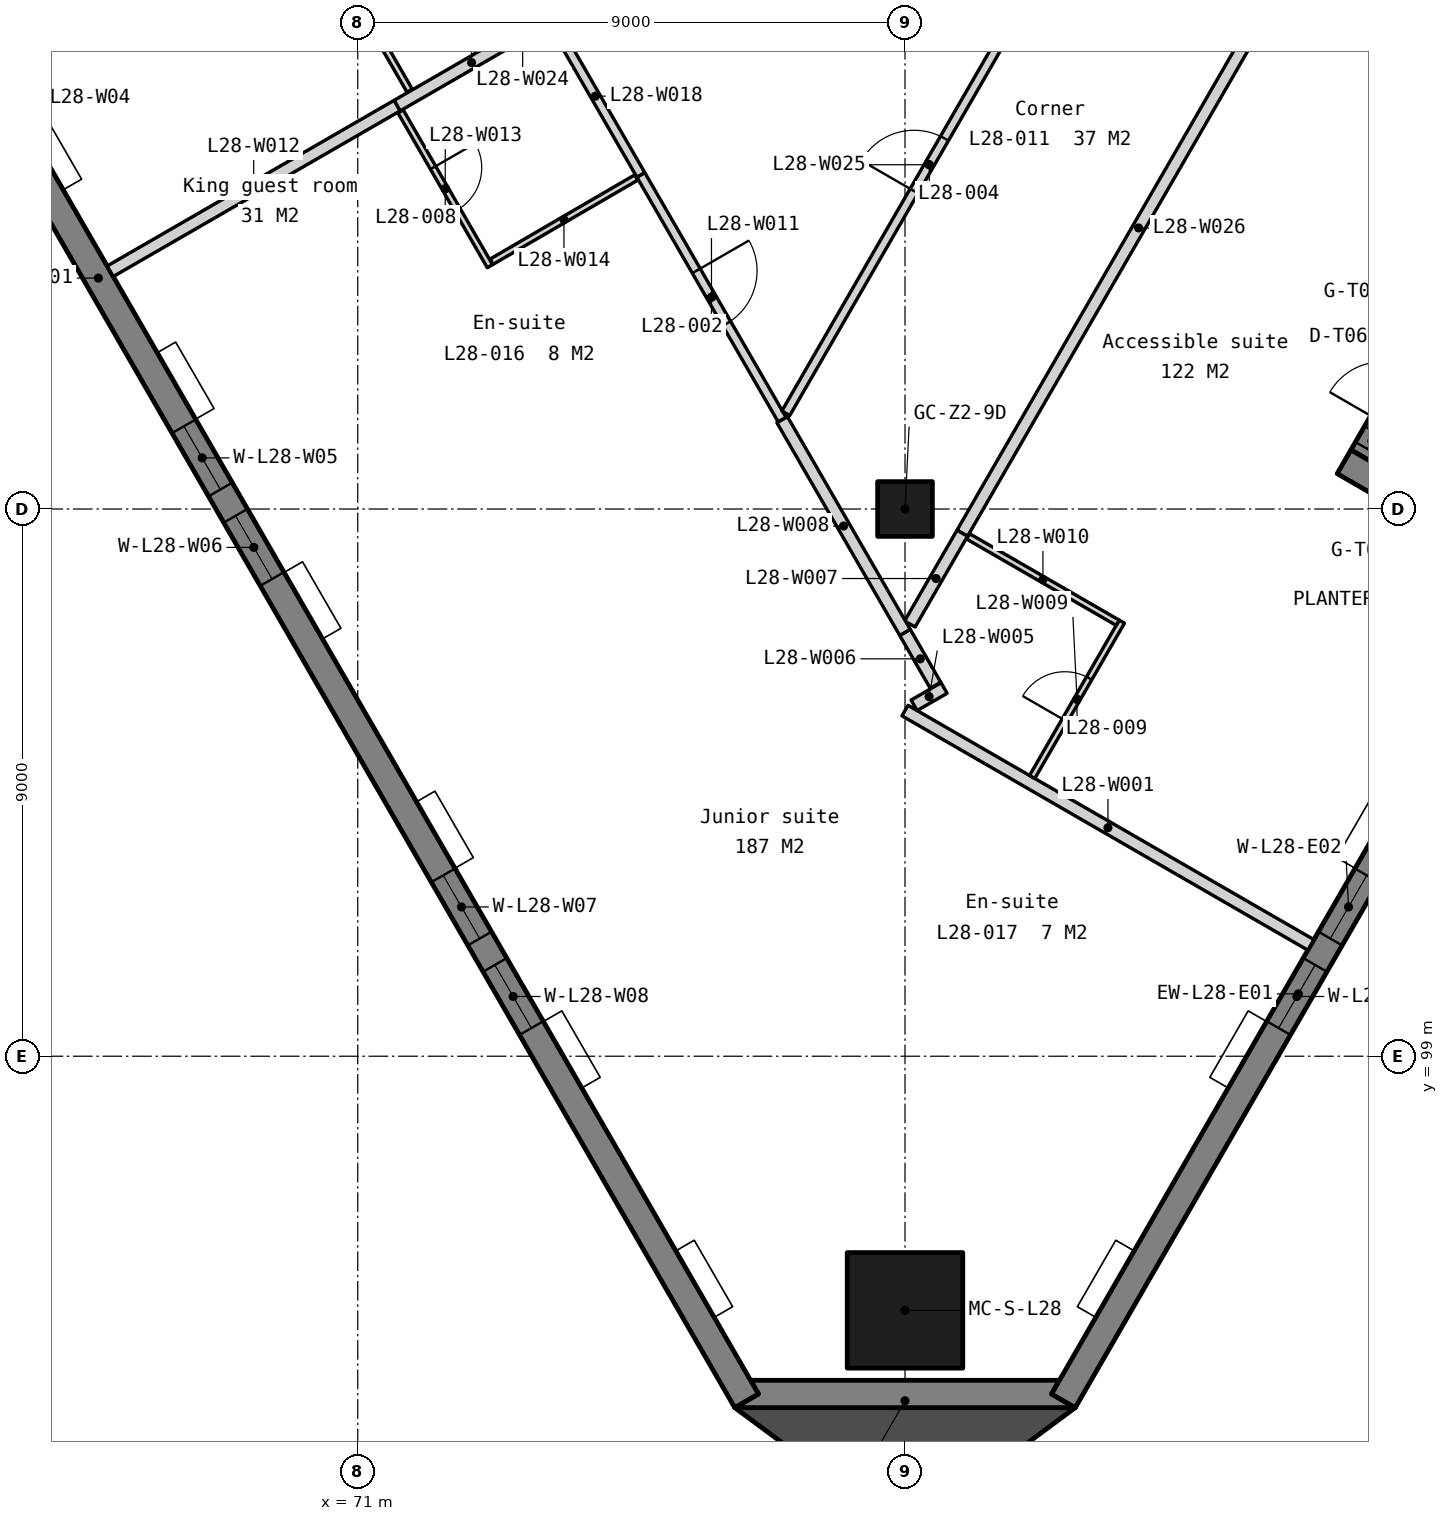
"""IFC4 building model, lengths in metres.
Left out: names, types, materials, properties, quantities, classifications, styles, units other than length and angle.
Written with IfcOpenShell. Run it as: python <this file> out.ifc"""

import sys

from ifc_helpers import new_model, si_unit, direction, frame, frame_2d, origin, origin_2d, place, context, subcontext, project, spatial, polyline, rectangle, outline, extrude, element, fill, save


model = new_model("IFC4")
c1 = context("Model", 3, precision=1e-05, world=origin(), true_north=direction((0.0, 1.0)))
c2 = subcontext(c1, "Body", "Model", "MODEL_VIEW")
j1 = project(units=[si_unit("LENGTHUNIT", "METRE"), si_unit("PLANEANGLEUNIT", "RADIAN")], contexts=[c1])
p1 = place(None, origin())
s1 = spatial("IfcSite", under=j1, at=p1, CompositionType="ELEMENT")
p2 = place(p1, origin())
s2 = spatial("IfcBuilding", under=s1, at=p2, CompositionType="ELEMENT")
p3 = place(p2, frame((0.0, 0.0, 113.3)))
s3 = spatial("IfcBuildingStorey", under=s2, at=p3, CompositionType="ELEMENT", Elevation=113.3)
p4 = place(p3, frame((80.0, 108.0, 0.0), z_axis=(0.0, 0.0, 1.0), x_axis=(1.0, 0.0, 0.0)))
e1 = element("IfcColumn", 1, at=p4, inside=s3, PredefinedType="COLUMN", context=c2, shape_type="SweptSolid", body=[
    extrude(rectangle(XDim=0.9, YDim=0.9, at=origin_2d()), origin(), (0.0, 0.0, 1.0), 3.5),
])
p5 = place(p3, frame((80.0, 94.82, 0.0), z_axis=(0.0, 0.0, 1.0), x_axis=(1.0, 0.0, 0.0)))
e2 = element("IfcColumn", 2, at=p5, inside=s3, PredefinedType="COLUMN", context=c2, shape_type="SweptSolid", body=[
    extrude(rectangle(XDim=1.9, YDim=1.9, at=origin_2d()), origin(), (0.0, 0.0, 1.0), 3.5),
])
p6 = place(p3, frame((0.0, 0.0, -0.15)))
e3 = element("IfcWall", 3, at=p6, inside=s3, PredefinedType="SOLIDWALL", context=c2, shape_type="SweptSolid", body=[
    extrude(outline(polyline([(77.2, 93.22), (77.59, 93.445), (77.46, 93.67), (82.54, 93.67), (82.41, 93.445), (82.8, 93.22), (77.2, 93.22)])), origin(), (0.0, 0.0, 1.0), 3.5),
])
p7 = place(p3, frame((56.073, 130.263, -0.15), z_axis=(0.0, 0.0, 1.0), x_axis=(0.500000478905, -0.866025127289, 0.0)))
e4 = element("IfcWall", 4, at=p7, inside=s3, PredefinedType="SOLIDWALL", context=c2, shape_type="SweptSolid", body=[
    extrude(outline(polyline([(42.643, 0.0), (42.643, 3.5), (0.0, 3.5), (0.0, 0.0), (42.643, 0.0)])), frame((0.0, 0.225, 0.0), z_axis=(0.0, -1.0, 0.0), x_axis=(1.0, 0.0, 0.0)), (0.0, 0.0, 1.0), 0.45),
])
p8 = place(p7, frame((7.079, 0.0, 1.05)))
e5 = element("IfcOpeningElement", 5, at=p8, cuts=e4, PredefinedType="OPENING", context=c2, shape_type="SweptSolid", body=[
    extrude(rectangle(XDim=1.2, YDim=1.5, at=frame_2d((0.6, 0.75))), frame((0.0, 0.235, 0.0), z_axis=(0.0, -1.0, 0.0), x_axis=(1.0, 0.0, 0.0)), (0.0, 0.0, 1.0), 0.47),
])
p9 = place(p7, frame((8.779, 0.0, 1.05)))
e6 = element("IfcOpeningElement", 6, at=p9, cuts=e4, PredefinedType="OPENING", context=c2, shape_type="SweptSolid", body=[
    extrude(rectangle(XDim=1.2, YDim=1.5, at=frame_2d((0.6, 0.75))), frame((0.0, 0.235, 0.0), z_axis=(0.0, -1.0, 0.0), x_axis=(1.0, 0.0, 0.0)), (0.0, 0.0, 1.0), 0.47),
])
p10 = place(p7, frame((15.607, 0.0, 1.05)))
e7 = element("IfcOpeningElement", 7, at=p10, cuts=e4, PredefinedType="OPENING", context=c2, shape_type="SweptSolid", body=[
    extrude(rectangle(XDim=1.2, YDim=1.5, at=frame_2d((0.6, 0.75))), frame((0.0, 0.235, 0.0), z_axis=(0.0, -1.0, 0.0), x_axis=(1.0, 0.0, 0.0)), (0.0, 0.0, 1.0), 0.47),
])
p11 = place(p7, frame((17.307, 0.0, 1.05)))
e8 = element("IfcOpeningElement", 8, at=p11, cuts=e4, PredefinedType="OPENING", context=c2, shape_type="SweptSolid", body=[
    extrude(rectangle(XDim=1.2, YDim=1.5, at=frame_2d((0.6, 0.75))), frame((0.0, 0.235, 0.0), z_axis=(0.0, -1.0, 0.0), x_axis=(1.0, 0.0, 0.0)), (0.0, 0.0, 1.0), 0.47),
])
p12 = place(p7, frame((24.136, 0.0, 1.05)))
e9 = element("IfcOpeningElement", 9, at=p12, cuts=e4, PredefinedType="OPENING", context=c2, shape_type="SweptSolid", body=[
    extrude(rectangle(XDim=1.2, YDim=1.5, at=frame_2d((0.6, 0.75))), frame((0.0, 0.235, 0.0), z_axis=(0.0, -1.0, 0.0), x_axis=(1.0, 0.0, 0.0)), (0.0, 0.0, 1.0), 0.47),
])
p13 = place(p7, frame((25.836, 0.0, 1.05)))
e10 = element("IfcOpeningElement", 10, at=p13, cuts=e4, PredefinedType="OPENING", context=c2, shape_type="SweptSolid", body=[
    extrude(rectangle(XDim=1.2, YDim=1.5, at=frame_2d((0.6, 0.75))), frame((0.0, 0.235, 0.0), z_axis=(0.0, -1.0, 0.0), x_axis=(1.0, 0.0, 0.0)), (0.0, 0.0, 1.0), 0.47),
])
p14 = place(p7, frame((32.665, 0.0, 1.05)))
e11 = element("IfcOpeningElement", 11, at=p14, cuts=e4, PredefinedType="OPENING", context=c2, shape_type="SweptSolid", body=[
    extrude(rectangle(XDim=1.2, YDim=1.5, at=frame_2d((0.6, 0.75))), frame((0.0, 0.235, 0.0), z_axis=(0.0, -1.0, 0.0), x_axis=(1.0, 0.0, 0.0)), (0.0, 0.0, 1.0), 0.47),
])
p15 = place(p7, frame((34.365, 0.0, 1.05)))
e12 = element("IfcOpeningElement", 12, at=p15, cuts=e4, PredefinedType="OPENING", context=c2, shape_type="SweptSolid", body=[
    extrude(rectangle(XDim=1.2, YDim=1.5, at=frame_2d((0.6, 0.75))), frame((0.0, 0.235, 0.0), z_axis=(0.0, -1.0, 0.0), x_axis=(1.0, 0.0, 0.0)), (0.0, 0.0, 1.0), 0.47),
])
p16 = place(p3, frame((82.605, 93.333, -0.15), z_axis=(0.0, 0.0, 1.0), x_axis=(0.499991795389, 0.866030140667, 0.0)))
e13 = element("IfcWall", 13, at=p16, inside=s3, PredefinedType="SOLIDWALL", context=c2, shape_type="SweptSolid", body=[
    extrude(outline(polyline([(0.0, 0.0), (0.0, 3.5), (15.457, 3.5), (15.457, 0.0), (0.0, 0.0)])), frame((0.0, 0.225, 0.0), z_axis=(0.0, -1.0, 0.0), x_axis=(1.0, 0.0, 0.0)), (0.0, 0.0, 1.0), 0.45),
])
p17 = place(p16, frame((7.079, 0.0, 1.05)))
e14 = element("IfcOpeningElement", 14, at=p17, cuts=e13, PredefinedType="OPENING", context=c2, shape_type="SweptSolid", body=[
    extrude(rectangle(XDim=1.2, YDim=1.5, at=frame_2d((0.6, 0.75))), frame((0.0, 0.235, 0.0), z_axis=(0.0, -1.0, 0.0), x_axis=(1.0, 0.0, 0.0)), (0.0, 0.0, 1.0), 0.47),
])
p18 = place(p16, frame((8.779, 0.0, 1.05)))
e15 = element("IfcOpeningElement", 15, at=p18, cuts=e13, PredefinedType="OPENING", context=c2, shape_type="SweptSolid", body=[
    extrude(rectangle(XDim=1.2, YDim=1.5, at=frame_2d((0.6, 0.75))), frame((0.0, 0.235, 0.0), z_axis=(0.0, -1.0, 0.0), x_axis=(1.0, 0.0, 0.0)), (0.0, 0.0, 1.0), 0.47),
])
p19 = place(p3, frame((90.641, 106.802, 0.0), z_axis=(0.0, 0.0, 1.0), x_axis=(-0.866047669374, 0.499961432884, 0.0)))
e16 = element("IfcWall", 16, at=p19, inside=s3, PredefinedType="SOLIDWALL", context=c2, shape_type="SweptSolid", body=[
    extrude(rectangle(XDim=3.95, YDim=0.45, at=frame_2d((1.975, 0.0))), origin(), (0.0, 0.0, 1.0), 6.85),
])
p20 = place(p3, frame((87.528, 108.859, -0.15), z_axis=(0.0, 0.0, 1.0), x_axis=(0.500077740698, 0.865980515519, 0.0)))
e17 = element("IfcWall", 17, at=p20, inside=s3, PredefinedType="SOLIDWALL", context=c2, shape_type="SweptSolid", body=[
    extrude(rectangle(XDim=2.3, YDim=0.45, at=frame_2d((1.15, 0.0))), origin(), (0.0, 0.0, 1.0), 3.5),
])
p21 = place(p20, frame((0.65, 0.0, 0.15)))
e18 = element("IfcOpeningElement", 18, at=p21, cuts=e17, PredefinedType="OPENING", context=c2, shape_type="SweptSolid", body=[
    extrude(rectangle(XDim=1.0, YDim=2.4, at=frame_2d((0.5, 1.2))), frame((0.0, 0.235, 0.0), z_axis=(0.0, -1.0, 0.0), x_axis=(1.0, 0.0, 0.0)), (0.0, 0.0, 1.0), 0.47),
])
p22 = place(p20, frame((0.15, 0.0, 0.15)))
e19 = element("IfcOpeningElement", 19, at=p22, cuts=e17, PredefinedType="OPENING", context=c2, shape_type="SweptSolid", body=[
    extrude(rectangle(XDim=0.3, YDim=2.4, at=frame_2d((0.15, 1.2))), frame((0.0, 0.235, 0.0), z_axis=(0.0, -1.0, 0.0), x_axis=(1.0, 0.0, 0.0)), (0.0, 0.0, 1.0), 0.47),
])
p23 = place(p20, frame((1.85, 0.0, 0.15)))
e20 = element("IfcOpeningElement", 20, at=p23, cuts=e17, PredefinedType="OPENING", context=c2, shape_type="SweptSolid", body=[
    extrude(rectangle(XDim=0.3, YDim=2.4, at=frame_2d((0.15, 1.2))), frame((0.0, 0.235, 0.0), z_axis=(0.0, -1.0, 0.0), x_axis=(1.0, 0.0, 0.0)), (0.0, 0.0, 1.0), 0.47),
])
p24 = place(p3, frame((0.0, 0.0, -0.15)))
e21 = element("IfcWall", 21, at=p24, inside=s3, PredefinedType="SOLIDWALL", context=c2, shape_type="SweptSolid", body=[
    extrude(outline(polyline([(77.2, 93.22), (80.0, 91.148), (82.8, 93.22), (77.2, 93.22)])), origin(), (0.0, 0.0, 1.0), 3.5),
])
p25 = place(p3, frame((80.0, 104.685, 0.0), z_axis=(0.0, 0.0, 1.0), x_axis=(0.866027859193, -0.499995747083, 0.0)))
e22 = element("IfcWall", 22, at=p25, inside=s3, PredefinedType="PARTITIONING", context=c2, shape_type="SweptSolid", body=[
    extrude(rectangle(XDim=7.707, YDim=0.2, at=frame_2d((3.854, 0.0))), origin(), (0.0, 0.0, 1.0), 3.35),
])
p26 = place(p3, frame((80.15, 104.771, 0.0), z_axis=(0.0, 0.0, 1.0), x_axis=(0.866149873562, 0.499784350024, 0.0)))
e23 = element("IfcWall", 23, at=p26, inside=s3, PredefinedType="PARTITIONING", context=c2, shape_type="SweptSolid", body=[
    extrude(rectangle(XDim=0.569, YDim=0.2, at=frame_2d((0.285, 0.0))), origin(), (0.0, 0.0, 1.0), 3.35),
])
p27 = place(p3, frame((80.0, 105.97, 0.0), z_axis=(0.0, 0.0, 1.0), x_axis=(0.499567963903, -0.866274696295, 0.0)))
e24 = element("IfcWall", 24, at=p27, inside=s3, PredefinedType="PARTITIONING", context=c2, shape_type="SweptSolid", body=[
    extrude(rectangle(XDim=1.003, YDim=0.2, at=frame_2d((0.502, 0.0))), origin(), (0.0, 0.0, 1.0), 3.35),
])
p28 = place(p3, frame((80.08, 106.109, 0.0), z_axis=(0.0, 0.0, 1.0), x_axis=(0.500032554596, 0.866006607564, 0.0)))
e25 = element("IfcWall", 25, at=p28, inside=s3, PredefinedType="PARTITIONING", context=c2, shape_type="SweptSolid", body=[
    extrude(rectangle(XDim=1.727, YDim=0.2, at=frame_2d((0.863, 0.0))), origin(), (0.0, 0.0, 1.0), 3.35),
])
p29 = place(p3, frame((77.979, 109.47, 0.0), z_axis=(0.0, 0.0, 1.0), x_axis=(0.50000482701, -0.866022616891, 0.0)))
e26 = element("IfcWall", 26, at=p29, inside=s3, PredefinedType="PARTITIONING", context=c2, shape_type="SweptSolid", body=[
    extrude(rectangle(XDim=4.042, YDim=0.2, at=frame_2d((2.021, 0.0))), origin(), (0.0, 0.0, 1.0), 3.35),
])
p30 = place(p3, frame((82.091, 103.593, 0.0), z_axis=(0.0, 0.0, 1.0), x_axis=(0.500001826776, 0.866024349092, 0.0)))
e27 = element("IfcWall", 27, at=p30, inside=s3, PredefinedType="PARTITIONING", context=c2, shape_type="SweptSolid", body=[
    extrude(rectangle(XDim=2.95, YDim=0.1, at=frame_2d((1.475, 0.0))), origin(), (0.0, 0.0, 1.0), 3.35),
])
p31 = place(p30, frame((1.075, 0.0, 0.0)))
e28 = element("IfcOpeningElement", 28, at=p31, cuts=e27, PredefinedType="OPENING", context=c2, shape_type="SweptSolid", body=[
    extrude(rectangle(XDim=0.8, YDim=2.1, at=frame_2d((0.4, 1.05))), frame((0.0, 0.06, 0.0), z_axis=(0.0, -1.0, 0.0), x_axis=(1.0, 0.0, 0.0)), (0.0, 0.0, 1.0), 0.12),
])
p32 = place(p3, frame((81.039, 107.549, 0.0), z_axis=(0.0, 0.0, 1.0), x_axis=(0.866033839264, -0.499985389037, 0.0)))
e29 = element("IfcWall", 29, at=p32, inside=s3, PredefinedType="PARTITIONING", context=c2, shape_type="SweptSolid", body=[
    extrude(rectangle(XDim=2.84, YDim=0.1, at=frame_2d((1.42, 0.0))), origin(), (0.0, 0.0, 1.0), 3.35),
])
p33 = place(p3, frame((75.655, 113.496, 0.0), z_axis=(0.0, 0.0, 1.0), x_axis=(0.499986163319, -0.866033392248, 0.0)))
e30 = element("IfcWall", 30, at=p33, inside=s3, PredefinedType="PARTITIONING", context=c2, shape_type="SweptSolid", body=[
    extrude(rectangle(XDim=4.648, YDim=0.15, at=frame_2d((2.324, 0.0))), origin(), (0.0, 0.0, 1.0), 3.35),
])
p34 = place(p33, frame((1.824, 0.0, 0.0)))
e31 = element("IfcOpeningElement", 31, at=p34, cuts=e30, PredefinedType="OPENING", context=c2, shape_type="SweptSolid", body=[
    extrude(rectangle(XDim=1.0, YDim=2.1, at=frame_2d((0.5, 1.05))), frame((0.0, 0.085, 0.0), z_axis=(0.0, -1.0, 0.0), x_axis=(1.0, 0.0, 0.0)), (0.0, 0.0, 1.0), 0.17),
])
p35 = place(p3, frame((66.929, 111.91, 0.0), z_axis=(0.0, 0.0, 1.0), x_axis=(0.866012511928, 0.500022328685, 0.0)))
e32 = element("IfcWall", 32, at=p35, inside=s3, PredefinedType="PARTITIONING", context=c2, shape_type="SweptSolid", body=[
    extrude(rectangle(XDim=5.45, YDim=0.2, at=frame_2d((2.725, 0.0))), origin(), (0.0, 0.0, 1.0), 3.35),
])
p36 = place(p3, frame((71.704, 114.54, 0.0), z_axis=(0.0, 0.0, 1.0), x_axis=(0.499988418424, -0.866032090307, 0.0)))
e33 = element("IfcWall", 33, at=p36, inside=s3, PredefinedType="PARTITIONING", context=c2, shape_type="SweptSolid", body=[
    extrude(rectangle(XDim=2.94, YDim=0.1, at=frame_2d((1.47, 0.0))), origin(), (0.0, 0.0, 1.0), 3.35),
])
p37 = place(p36, frame((1.07, 0.0, 0.0)))
e34 = element("IfcOpeningElement", 34, at=p37, cuts=e33, PredefinedType="OPENING", context=c2, shape_type="SweptSolid", body=[
    extrude(rectangle(XDim=0.8, YDim=2.1, at=frame_2d((0.4, 1.05))), frame((0.0, 0.06, 0.0), z_axis=(0.0, -1.0, 0.0), x_axis=(1.0, 0.0, 0.0)), (0.0, 0.0, 1.0), 0.12),
])
p38 = place(p3, frame((73.201, 112.067, 0.0), z_axis=(0.0, 0.0, 1.0), x_axis=(0.8642895013, 0.502994689775, 0.0)))
e35 = element("IfcWall", 35, at=p38, inside=s3, PredefinedType="PARTITIONING", context=c2, shape_type="SweptSolid", body=[
    extrude(rectangle(XDim=2.755, YDim=0.1, at=frame_2d((1.377, 0.0))), origin(), (0.0, 0.0, 1.0), 3.35),
])
p39 = place(p3, frame((71.649, 114.635, 0.0), z_axis=(0.0, 0.0, 1.0), x_axis=(0.866011447264, 0.500024172624, 0.0)))
e36 = element("IfcWall", 36, at=p39, inside=s3, PredefinedType="PARTITIONING", context=c2, shape_type="SweptSolid", body=[
    extrude(rectangle(XDim=2.825, YDim=0.2, at=frame_2d((1.413, 0.0))), origin(), (0.0, 0.0, 1.0), 3.35),
])
p40 = place(p3, frame((70.684, 116.907, 0.0), z_axis=(0.0, 0.0, 1.0), x_axis=(0.499999433879, -0.866025730634, 0.0)))
e37 = element("IfcWall", 37, at=p40, inside=s3, PredefinedType="PARTITIONING", context=c2, shape_type="SweptSolid", body=[
    extrude(rectangle(XDim=2.34, YDim=0.1, at=frame_2d((1.17, 0.0))), origin(), (0.0, 0.0, 1.0), 3.35),
])
p41 = place(p40, frame((0.77, 0.0, 0.0)))
e38 = element("IfcOpeningElement", 38, at=p41, cuts=e37, PredefinedType="OPENING", context=c2, shape_type="SweptSolid", body=[
    extrude(rectangle(XDim=0.8, YDim=2.1, at=frame_2d((0.4, 1.05))), frame((0.0, 0.06, 0.0), z_axis=(0.0, -1.0, 0.0), x_axis=(1.0, 0.0, 0.0)), (0.0, 0.0, 1.0), 0.12),
])
p42 = place(p3, frame((74.16, 116.085, 0.0), z_axis=(0.0, 0.0, 1.0), x_axis=(0.500038154266, -0.866003374288, 0.0)))
e39 = element("IfcWall", 39, at=p42, inside=s3, PredefinedType="PARTITIONING", context=c2, shape_type="SweptSolid", body=[
    extrude(rectangle(XDim=2.99, YDim=0.15, at=frame_2d((1.495, 0.0))), origin(), (0.0, 0.0, 1.0), 3.35),
])
p43 = place(p3, frame((78.039, 109.574, 0.0), z_axis=(0.0, 0.0, 1.0), x_axis=(0.50000526672, 0.866022363021, 0.0)))
e40 = element("IfcWall", 40, at=p43, inside=s3, PredefinedType="PARTITIONING", context=c2, shape_type="SweptSolid", body=[
    extrude(rectangle(XDim=9.44, YDim=0.15, at=frame_2d((4.72, 0.0))), origin(), (0.0, 0.0, 1.0), 3.35),
])
p44 = place(p43, frame((4.22, 0.0, 0.0)))
e41 = element("IfcOpeningElement", 41, at=p44, cuts=e40, PredefinedType="OPENING", context=c2, shape_type="SweptSolid", body=[
    extrude(rectangle(XDim=1.0, YDim=2.1, at=frame_2d((0.5, 1.05))), frame((0.0, 0.085, 0.0), z_axis=(0.0, -1.0, 0.0), x_axis=(1.0, 0.0, 0.0)), (0.0, 0.0, 1.0), 0.17),
])
p45 = place(p3, frame((80.943, 107.604, 0.0), z_axis=(0.0, 0.0, 1.0), x_axis=(0.499981374323, 0.866036157057, 0.0)))
e42 = element("IfcWall", 42, at=p45, inside=s3, PredefinedType="PARTITIONING", context=c2, shape_type="SweptSolid", body=[
    extrude(rectangle(XDim=11.59, YDim=0.2, at=frame_2d((5.795, 0.0))), origin(), (0.0, 0.0, 1.0), 3.35),
])
p46 = place(p12, origin())
e43 = element("IfcWindow", 43, at=p46, inside=s3, PartitioningType="SINGLE_PANEL", PredefinedType="WINDOW", context=c2, shape_type="SweptSolid", body=[
    extrude(rectangle(XDim=1.2, YDim=1.5, at=frame_2d((0.6, 0.75))), frame((0.0, 0.03, 0.0), z_axis=(0.0, -1.0, 0.0), x_axis=(1.0, 0.0, 0.0)), (0.0, 0.0, 1.0), 0.06),
])
fill(e9, e43)
p47 = place(p13, origin())
e44 = element("IfcWindow", 44, at=p47, inside=s3, PartitioningType="SINGLE_PANEL", PredefinedType="WINDOW", context=c2, shape_type="SweptSolid", body=[
    extrude(rectangle(XDim=1.2, YDim=1.5, at=frame_2d((0.6, 0.75))), frame((0.0, 0.03, 0.0), z_axis=(0.0, -1.0, 0.0), x_axis=(1.0, 0.0, 0.0)), (0.0, 0.0, 1.0), 0.06),
])
fill(e10, e44)
p48 = place(p14, origin())
e45 = element("IfcWindow", 45, at=p48, inside=s3, PartitioningType="SINGLE_PANEL", PredefinedType="WINDOW", context=c2, shape_type="SweptSolid", body=[
    extrude(rectangle(XDim=1.2, YDim=1.5, at=frame_2d((0.6, 0.75))), frame((0.0, 0.03, 0.0), z_axis=(0.0, -1.0, 0.0), x_axis=(1.0, 0.0, 0.0)), (0.0, 0.0, 1.0), 0.06),
])
fill(e11, e45)
p49 = place(p15, origin())
e46 = element("IfcWindow", 46, at=p49, inside=s3, PartitioningType="SINGLE_PANEL", PredefinedType="WINDOW", context=c2, shape_type="SweptSolid", body=[
    extrude(rectangle(XDim=1.2, YDim=1.5, at=frame_2d((0.6, 0.75))), frame((0.0, 0.03, 0.0), z_axis=(0.0, -1.0, 0.0), x_axis=(1.0, 0.0, 0.0)), (0.0, 0.0, 1.0), 0.06),
])
fill(e12, e46)
p50 = place(p17, origin())
e47 = element("IfcWindow", 47, at=p50, inside=s3, PartitioningType="SINGLE_PANEL", PredefinedType="WINDOW", context=c2, shape_type="SweptSolid", body=[
    extrude(rectangle(XDim=1.2, YDim=1.5, at=frame_2d((0.6, 0.75))), frame((0.0, 0.03, 0.0), z_axis=(0.0, -1.0, 0.0), x_axis=(1.0, 0.0, 0.0)), (0.0, 0.0, 1.0), 0.06),
])
fill(e14, e47)
p51 = place(p18, origin())
e48 = element("IfcWindow", 48, at=p51, inside=s3, PartitioningType="SINGLE_PANEL", PredefinedType="WINDOW", context=c2, shape_type="SweptSolid", body=[
    extrude(rectangle(XDim=1.2, YDim=1.5, at=frame_2d((0.6, 0.75))), frame((0.0, 0.03, 0.0), z_axis=(0.0, -1.0, 0.0), x_axis=(1.0, 0.0, 0.0)), (0.0, 0.0, 1.0), 0.06),
])
fill(e15, e48)
p52 = place(p22, origin())
e49 = element("IfcWindow", 49, at=p52, inside=s3, PartitioningType="SINGLE_PANEL", PredefinedType="WINDOW", context=c2, shape_type="SweptSolid", body=[
    extrude(rectangle(XDim=0.3, YDim=2.4, at=frame_2d((0.15, 1.2))), frame((0.0, 0.03, 0.0), z_axis=(0.0, -1.0, 0.0), x_axis=(1.0, 0.0, 0.0)), (0.0, 0.0, 1.0), 0.06),
])
fill(e19, e49)
p53 = place(p34, origin())
e50 = element("IfcDoor", 50, at=p53, inside=s3, OperationType="SINGLE_SWING_LEFT", PredefinedType="DOOR", context=c2, shape_type="SweptSolid", body=[
    extrude(rectangle(XDim=1.0, YDim=2.1, at=frame_2d((0.5, 1.05))), frame((0.0, 0.025, 0.0), z_axis=(0.0, -1.0, 0.0), x_axis=(1.0, 0.0, 0.0)), (0.0, 0.0, 1.0), 0.05),
])
fill(e31, e50)
p54 = place(p44, origin())
e51 = element("IfcDoor", 51, at=p54, inside=s3, OperationType="SINGLE_SWING_LEFT", PredefinedType="DOOR", context=c2, shape_type="SweptSolid", body=[
    extrude(rectangle(XDim=1.0, YDim=2.1, at=frame_2d((0.5, 1.05))), frame((0.0, 0.025, 0.0), z_axis=(0.0, -1.0, 0.0), x_axis=(1.0, 0.0, 0.0)), (0.0, 0.0, 1.0), 0.05),
])
fill(e41, e51)
p55 = place(p37, origin())
e52 = element("IfcDoor", 52, at=p55, inside=s3, OperationType="SINGLE_SWING_LEFT", PredefinedType="DOOR", context=c2, shape_type="SweptSolid", body=[
    extrude(rectangle(XDim=0.8, YDim=2.1, at=frame_2d((0.4, 1.05))), frame((0.0, 0.025, 0.0), z_axis=(0.0, -1.0, 0.0), x_axis=(1.0, 0.0, 0.0)), (0.0, 0.0, 1.0), 0.05),
])
fill(e34, e52)
p56 = place(p31, origin())
e53 = element("IfcDoor", 53, at=p56, inside=s3, OperationType="SINGLE_SWING_LEFT", PredefinedType="DOOR", context=c2, shape_type="SweptSolid", body=[
    extrude(rectangle(XDim=0.8, YDim=2.1, at=frame_2d((0.4, 1.05))), frame((0.0, 0.025, 0.0), z_axis=(0.0, -1.0, 0.0), x_axis=(1.0, 0.0, 0.0)), (0.0, 0.0, 1.0), 0.05),
])
fill(e28, e53)
save(model, sys.argv[1])
